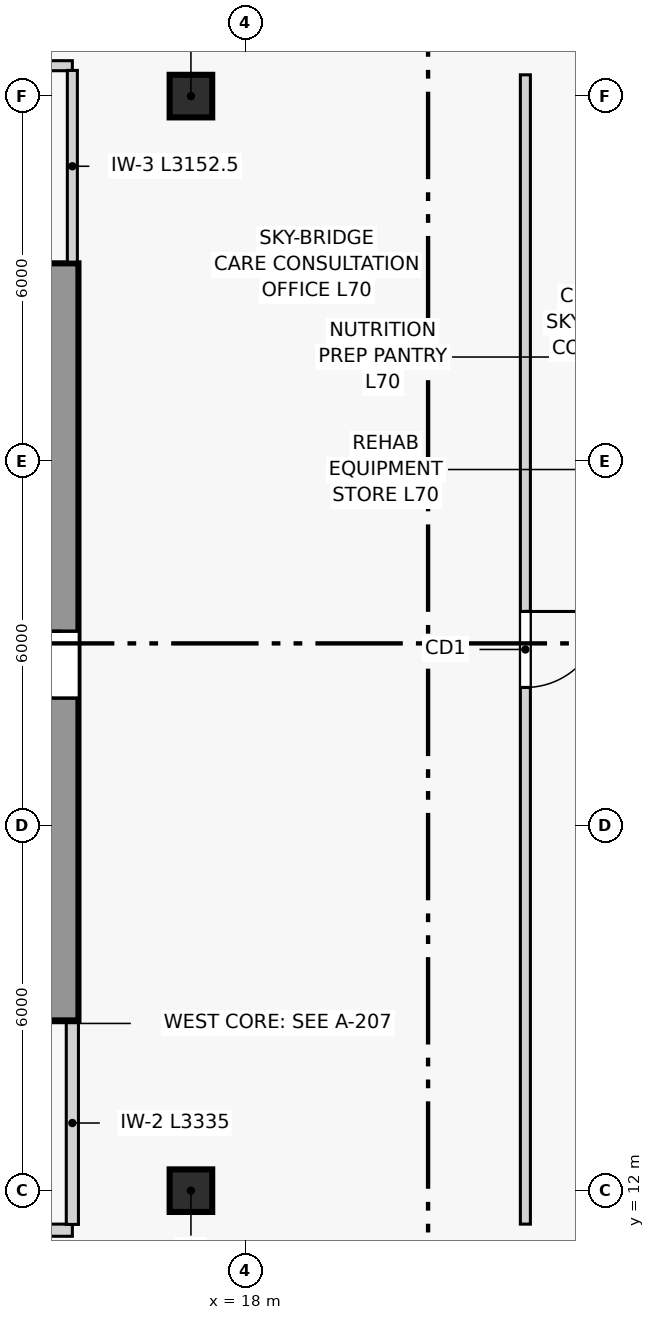
"""IFC4 building model, lengths in metres.
Left out: names, types, materials, properties, quantities, classifications, styles, units other than length and angle.
Written with IfcOpenShell. Run it as: python <this file> out.ifc"""

import sys

from ifc_helpers import new_model, si_unit, direction, frame, frame_2d, origin, origin_2d, place, context, subcontext, project, spatial, rectangle, extrude, source, transform, mapped, element, fill, save


model = new_model("IFC4")
c1 = context("Model", 3, precision=1e-05, world=origin(), true_north=direction((0.0, 1.0)))
c2 = subcontext(c1, "Body", "Model", "MODEL_VIEW")
j1 = project(units=[si_unit("LENGTHUNIT", "METRE"), si_unit("PLANEANGLEUNIT", "RADIAN")], contexts=[c1])
p1 = place(None, origin())
s1 = spatial("IfcSite", under=j1, at=p1, CompositionType="ELEMENT")
p2 = place(p1, origin())
s2 = spatial("IfcBuilding", under=s1, at=p2, CompositionType="ELEMENT")
p3 = place(p2, frame((0.0, 0.0, 267.3)))
s3 = spatial("IfcBuildingStorey", under=s2, at=p3, CompositionType="ELEMENT", Elevation=267.3)
p4 = place(p3, frame((14.975, 14.8, 0.0), z_axis=(0.0, 0.0, 1.0), x_axis=(0.0, 1.0, 0.0)))
e1 = element("IfcWall", 1, at=p4, inside=s3, PredefinedType="SHEAR", context=c2, shape_type="SweptSolid", body=[
    extrude(rectangle(XDim=12.45, YDim=0.55, at=frame_2d((6.225, 0.0))), origin(), (0.0, 0.0, 1.0), 3.6),
])
p5 = place(p4, frame((5.3, 0.0, 0.0)))
e2 = element("IfcOpeningElement", 2, at=p5, cuts=e1, PredefinedType="OPENING", context=c2, shape_type="SweptSolid", body=[
    extrude(rectangle(XDim=1.1, YDim=2.2, at=frame_2d((0.55, 1.1))), frame((0.0, 0.285, 0.0), z_axis=(0.0, -1.0, 0.0), x_axis=(1.0, 0.0, 0.0)), (0.0, 0.0, 1.0), 0.57),
])
m1 = source(origin(), c2, "Body", "SweptSolid", [
    extrude(rectangle(XDim=0.7, YDim=0.7, at=origin_2d()), origin(), (0.0, 0.0, 1.0), 3.6),
])
for number, where, z_axis, x_axis in (
    (3, (17.1, 12.0, 0.0), (0.0, 0.0, 1.0), (1.0, 0.0, 0.0)),
    (4, (17.1, 30.0, 0.0), (0.0, 0.0, 1.0), (1.0, 0.0, 0.0)),
):
    element("IfcColumn", number, at=place(p3, frame(where, z_axis=z_axis, x_axis=x_axis)), inside=s3, PredefinedType="COLUMN", context=c2, shape_type="MappedRepresentation", body=[
        mapped(m1, transform((0.0, 0.0, 0.0), scale=1.0)),
    ])
p6 = place(p3, frame((8.05, 11.35, 0.0), z_axis=(0.0, 0.0, 1.0), x_axis=(1.0, 0.0, 0.0)))
e5 = element("IfcWall", 5, at=p6, inside=s3, PredefinedType="PARTITIONING", context=c2, shape_type="SweptSolid", body=[
    extrude(rectangle(XDim=7.1, YDim=0.2, at=frame_2d((3.55, 0.0))), origin(), (0.0, 0.0, 1.0), 3.32),
])
p7 = place(p6, frame((2.846, 0.0, 0.0)))
e6 = element("IfcOpeningElement", 6, at=p7, cuts=e5, PredefinedType="OPENING", context=c2, shape_type="SweptSolid", body=[
    extrude(rectangle(XDim=1.2, YDim=2.2, at=frame_2d((0.6, 1.1))), frame((0.0, 0.11, 0.0), z_axis=(0.0, -1.0, 0.0), x_axis=(1.0, 0.0, 0.0)), (0.0, 0.0, 1.0), 0.22),
])
p8 = place(p3, frame((15.15, 11.445, 0.0), z_axis=(0.0, 0.0, 1.0), x_axis=(0.0, 1.0, 0.0)))
e7 = element("IfcWall", 7, at=p8, inside=s3, PredefinedType="PARTITIONING", context=c2, shape_type="SweptSolid", body=[
    extrude(rectangle(XDim=3.335, YDim=0.2, at=frame_2d((1.667, 0.0))), origin(), (0.0, 0.0, 1.0), 3.32),
])
p9 = place(p3, frame((8.05, 30.5, 0.0), z_axis=(0.0, 0.0, 1.0), x_axis=(1.0, 0.0, 0.0)))
e8 = element("IfcWall", 8, at=p9, inside=s3, PredefinedType="PARTITIONING", context=c2, shape_type="SweptSolid", body=[
    extrude(rectangle(XDim=7.1, YDim=0.165, at=frame_2d((3.55, 0.0))), origin(), (0.0, 0.0, 1.0), 3.32),
])
p10 = place(p9, frame((2.95, 0.0, 0.0)))
e9 = element("IfcOpeningElement", 9, at=p10, cuts=e8, PredefinedType="OPENING", context=c2, shape_type="SweptSolid", body=[
    extrude(rectangle(XDim=1.2, YDim=2.2, at=frame_2d((0.6, 1.1))), frame((0.0, 0.093, 0.0), z_axis=(0.0, -1.0, 0.0), x_axis=(1.0, 0.0, 0.0)), (0.0, 0.0, 1.0), 0.185),
])
p11 = place(p3, frame((15.15, 27.27, 0.0), z_axis=(0.0, 0.0, 1.0), x_axis=(0.0, 1.0, 0.0)))
e10 = element("IfcWall", 10, at=p11, inside=s3, PredefinedType="PARTITIONING", context=c2, shape_type="SweptSolid", body=[
    extrude(rectangle(XDim=3.153, YDim=0.165, at=frame_2d((1.576, 0.0))), origin(), (0.0, 0.0, 1.0), 3.32),
])
p12 = place(p3, frame((22.6, 11.45, 0.0), z_axis=(0.0, 0.0, 1.0), x_axis=(0.0, 1.0, 0.0)))
e11 = element("IfcWall", 11, at=p12, inside=s3, PredefinedType="PARTITIONING", context=c2, shape_type="SweptSolid", body=[
    extrude(rectangle(XDim=18.9, YDim=0.165, at=frame_2d((9.45, 0.0))), origin(), (0.0, 0.0, 1.0), 3.32),
])
p13 = place(p12, frame((8.825, 0.0, 0.0)))
e12 = element("IfcOpeningElement", 12, at=p13, cuts=e11, PredefinedType="OPENING", context=c2, shape_type="SweptSolid", body=[
    extrude(rectangle(XDim=1.25, YDim=2.2, at=frame_2d((0.625, 1.1))), frame((0.0, 0.093, 0.0), z_axis=(0.0, -1.0, 0.0), x_axis=(1.0, 0.0, 0.0)), (0.0, 0.0, 1.0), 0.185),
])
m2 = source(origin(), c2, "Body", "SweptSolid", [
    extrude(rectangle(XDim=1.1, YDim=2.2, at=frame_2d((0.55, 1.1))), frame((0.0, 0.025, 0.0), z_axis=(0.0, -1.0, 0.0), x_axis=(1.0, 0.0, 0.0)), (0.0, 0.0, 1.0), 0.05),
])
p14 = place(p5, origin())
e13 = element("IfcDoor", 13, at=p14, inside=s3, OperationType="SINGLE_SWING_RIGHT", PredefinedType="DOOR", context=c2, shape_type="MappedRepresentation", body=[
    mapped(m2, transform((0.0, 0.0, 0.0), scale=1.0)),
])
fill(e2, e13)
m3 = source(origin(), c2, "Body", "SweptSolid", [
    extrude(rectangle(XDim=1.25, YDim=2.2, at=frame_2d((0.625, 1.1))), frame((0.0, 0.025, 0.0), z_axis=(0.0, -1.0, 0.0), x_axis=(1.0, 0.0, 0.0)), (0.0, 0.0, 1.0), 0.05),
])
p15 = place(p13, frame((1.25, 0.0, 0.0), z_axis=(0.0, 0.0, 1.0), x_axis=(-1.0, 0.0, 0.0)))
e14 = element("IfcDoor", 14, at=p15, inside=s3, OperationType="SINGLE_SWING_LEFT", PredefinedType="DOOR", context=c2, shape_type="MappedRepresentation", body=[
    mapped(m3, transform((0.0, 0.0, 0.0), scale=1.0)),
])
fill(e12, e14)
save(model, sys.argv[1])
